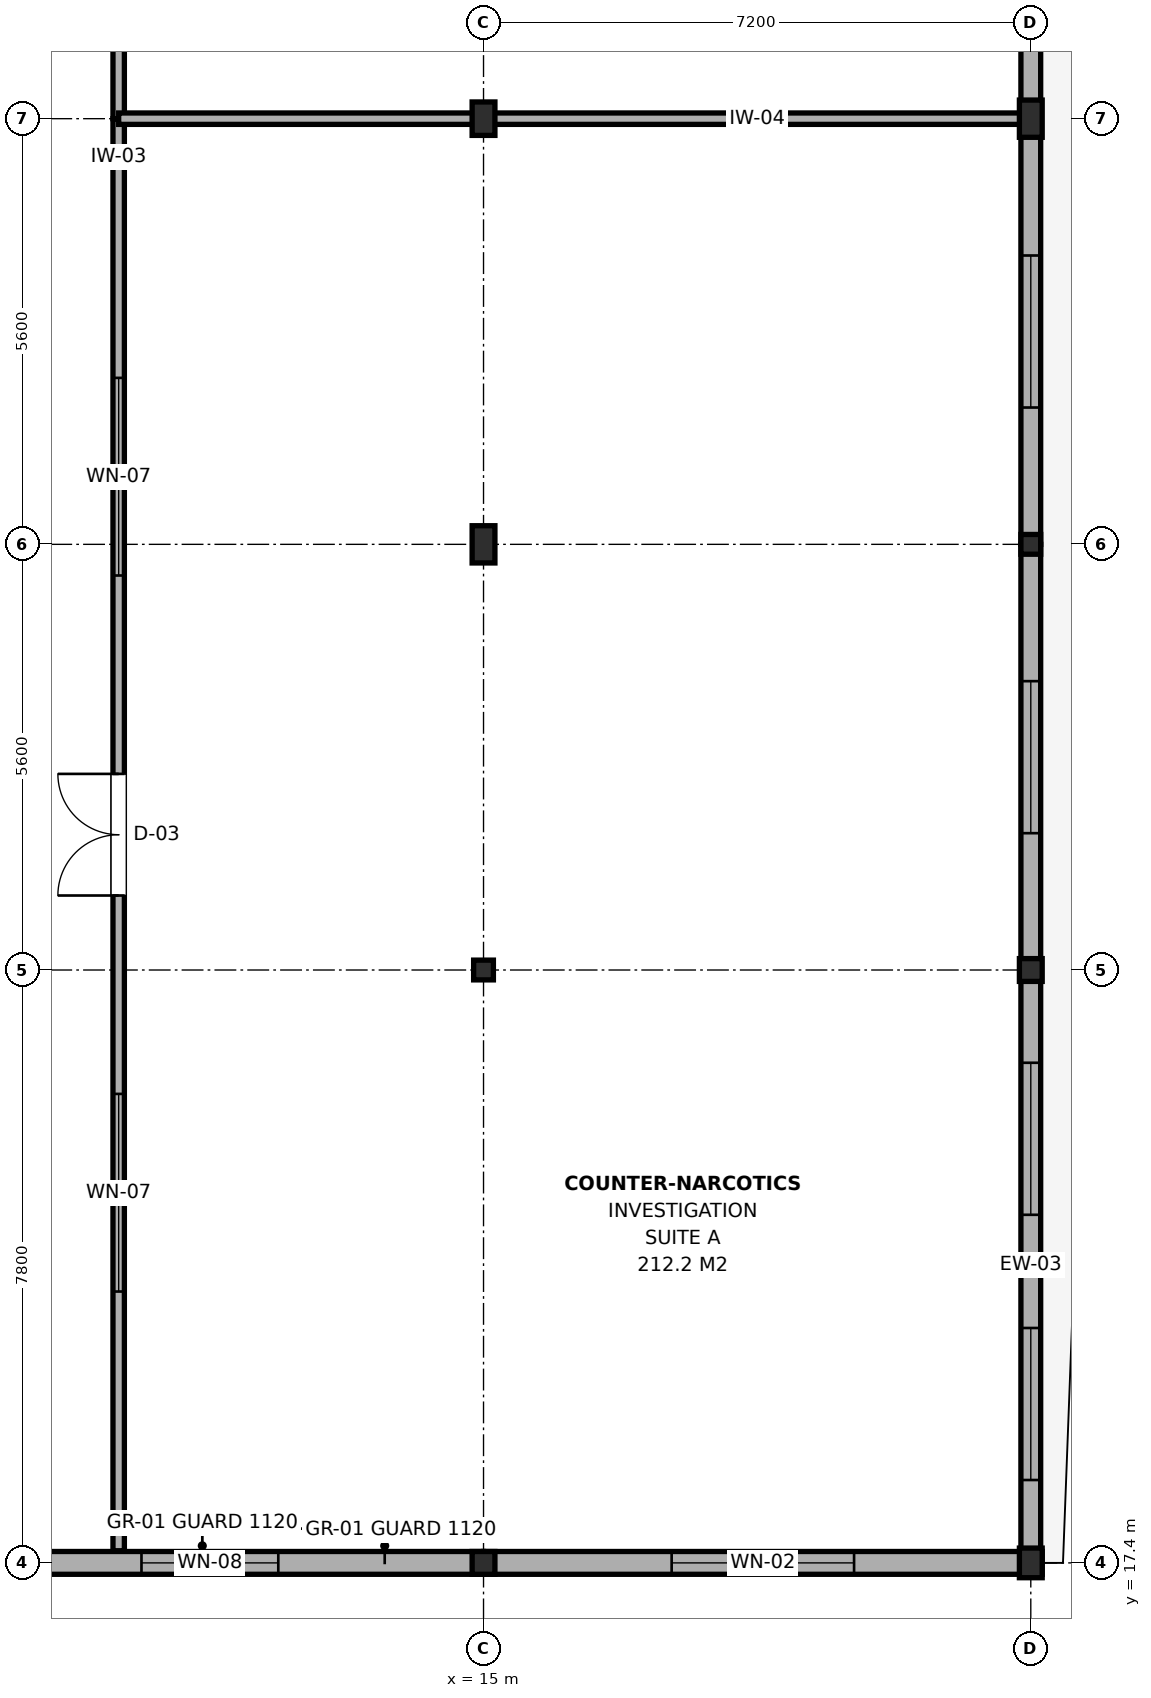
"""IFC4 building model, lengths in metres.
Left out: names, types, materials, properties, quantities, classifications, styles, units other than length and angle.
Written with IfcOpenShell. Run it as: python <this file> out.ifc"""

import sys

from ifc_helpers import new_model, si_unit, direction, frame, frame_2d, origin, origin_2d, place, context, subcontext, project, spatial, rectangle, i_section, extrude, element, fill, save


model = new_model("IFC4")
c1 = context("Model", 3, precision=1e-05, world=origin(), true_north=direction((0.0, 1.0)))
c2 = subcontext(c1, "Body", "Model", "MODEL_VIEW")
j1 = project(units=[si_unit("LENGTHUNIT", "METRE"), si_unit("PLANEANGLEUNIT", "RADIAN")], contexts=[c1])
p1 = place(None, origin())
s1 = spatial("IfcSite", under=j1, at=p1, CompositionType="ELEMENT")
p2 = place(p1, origin())
s2 = spatial("IfcBuilding", under=s1, at=p2, CompositionType="ELEMENT")
p3 = place(p2, frame((0.0, 0.0, 24.9)))
s3 = spatial("IfcBuildingStorey", under=s2, at=p3, CompositionType="ELEMENT", Elevation=24.9)
p4 = place(p3, frame((15.0, 17.4, 0.0), z_axis=(0.0, 0.0, 1.0), x_axis=(1.0, 0.0, 0.0)))
e1 = element("IfcColumn", 1, at=p4, inside=s3, PredefinedType="COLUMN", context=c2, shape_type="SweptSolid", body=[
    extrude(i_section(OverallWidth=0.3, OverallDepth=0.3, WebThickness=0.011, FlangeThickness=0.019, FilletRadius=0.027, at=origin_2d()), origin(), (0.0, 0.0, 1.0), 3.9),
])
p5 = place(p3, frame((15.0, 25.2, 0.0), z_axis=(0.0, 0.0, 1.0), x_axis=(1.0, 0.0, 0.0)))
e2 = element("IfcColumn", 2, at=p5, inside=s3, PredefinedType="COLUMN", context=c2, shape_type="SweptSolid", body=[
    extrude(i_section(OverallWidth=0.26, OverallDepth=0.26, WebThickness=0.01, FlangeThickness=0.018, FilletRadius=0.024, at=origin_2d()), origin(), (0.0, 0.0, 1.0), 3.9),
])
p6 = place(p3, frame((15.0, 30.8, 0.0), z_axis=(0.0, 0.0, 1.0), x_axis=(1.0, 0.0, 0.0)))
e3 = element("IfcColumn", 3, at=p6, inside=s3, PredefinedType="COLUMN", context=c2, shape_type="SweptSolid", body=[
    extrude(i_section(OverallWidth=0.3, OverallDepth=0.49, WebThickness=0.012, FlangeThickness=0.023, FilletRadius=0.027, at=origin_2d()), origin(), (0.0, 0.0, 1.0), 3.9),
])
p7 = place(p3, frame((15.0, 36.4, 0.0), z_axis=(0.0, 0.0, 1.0), x_axis=(1.0, 0.0, 0.0)))
e4 = element("IfcColumn", 4, at=p7, inside=s3, PredefinedType="COLUMN", context=c2, shape_type="SweptSolid", body=[
    extrude(i_section(OverallWidth=0.3, OverallDepth=0.44, WebThickness=0.011, FlangeThickness=0.021, FilletRadius=0.027, at=origin_2d()), origin(), (0.0, 0.0, 1.0), 3.9),
])
p8 = place(p3, frame((22.2, 17.4, 0.0), z_axis=(0.0, 0.0, 1.0), x_axis=(1.0, 0.0, 0.0)))
e5 = element("IfcColumn", 5, at=p8, inside=s3, PredefinedType="COLUMN", context=c2, shape_type="SweptSolid", body=[
    extrude(i_section(OverallWidth=0.3, OverallDepth=0.39, WebThickness=0.011, FlangeThickness=0.019, FilletRadius=0.027, at=origin_2d()), origin(), (0.0, 0.0, 1.0), 3.9),
])
p9 = place(p3, frame((22.2, 25.2, 0.0), z_axis=(0.0, 0.0, 1.0), x_axis=(1.0, 0.0, 0.0)))
e6 = element("IfcColumn", 6, at=p9, inside=s3, PredefinedType="COLUMN", context=c2, shape_type="SweptSolid", body=[
    extrude(i_section(OverallWidth=0.3, OverallDepth=0.3, WebThickness=0.011, FlangeThickness=0.019, FilletRadius=0.027, at=origin_2d()), origin(), (0.0, 0.0, 1.0), 3.9),
])
p10 = place(p3, frame((22.2, 30.8, 0.0), z_axis=(0.0, 0.0, 1.0), x_axis=(1.0, 0.0, 0.0)))
e7 = element("IfcColumn", 7, at=p10, inside=s3, PredefinedType="COLUMN", context=c2, shape_type="SweptSolid", body=[
    extrude(i_section(OverallWidth=0.26, OverallDepth=0.26, WebThickness=0.01, FlangeThickness=0.018, FilletRadius=0.024, at=origin_2d()), origin(), (0.0, 0.0, 1.0), 3.9),
])
p11 = place(p3, frame((22.2, 36.4, 0.0), z_axis=(0.0, 0.0, 1.0), x_axis=(1.0, 0.0, 0.0)))
e8 = element("IfcColumn", 8, at=p11, inside=s3, PredefinedType="COLUMN", context=c2, shape_type="SweptSolid", body=[
    extrude(i_section(OverallWidth=0.3, OverallDepth=0.49, WebThickness=0.012, FlangeThickness=0.023, FilletRadius=0.027, at=origin_2d()), origin(), (0.0, 0.0, 1.0), 3.9),
])
p12 = place(p3, frame((22.2, 17.27, 0.0), z_axis=(0.0, 0.0, 1.0), x_axis=(0.0, 1.0, 0.0)))
e9 = element("IfcWall", 9, at=p12, inside=s3, PredefinedType="SOLIDWALL", context=c2, shape_type="SweptSolid", body=[
    extrude(rectangle(XDim=7.93, YDim=0.26, at=frame_2d((3.965, 0.0))), origin(), (0.0, 0.0, 1.0), 3.265),
])
p13 = place(p12, frame((1.22, 0.0, 0.9)))
e10 = element("IfcOpeningElement", 10, at=p13, cuts=e9, PredefinedType="OPENING", context=c2, shape_type="SweptSolid", body=[
    extrude(rectangle(XDim=2.0, YDim=1.8, at=frame_2d((1.0, 0.9))), frame((0.0, 0.145, 0.0), z_axis=(0.0, -1.0, 0.0), x_axis=(1.0, 0.0, 0.0)), (0.0, 0.0, 1.0), 0.29),
])
p14 = place(p12, frame((4.71, 0.0, 0.9)))
e11 = element("IfcOpeningElement", 11, at=p14, cuts=e9, PredefinedType="OPENING", context=c2, shape_type="SweptSolid", body=[
    extrude(rectangle(XDim=2.0, YDim=1.8, at=frame_2d((1.0, 0.9))), frame((0.0, 0.145, 0.0), z_axis=(0.0, -1.0, 0.0), x_axis=(1.0, 0.0, 0.0)), (0.0, 0.0, 1.0), 0.29),
])
p15 = place(p3, frame((22.2, 25.2, 0.0), z_axis=(0.0, 0.0, 1.0), x_axis=(0.0, 1.0, 0.0)))
e12 = element("IfcWall", 12, at=p15, inside=s3, PredefinedType="SOLIDWALL", context=c2, shape_type="SweptSolid", body=[
    extrude(rectangle(XDim=5.6, YDim=0.26, at=frame_2d((2.8, 0.0))), origin(), (0.0, 0.0, 1.0), 3.265),
])
p16 = place(p15, frame((1.8, 0.0, 0.9)))
e13 = element("IfcOpeningElement", 13, at=p16, cuts=e12, PredefinedType="OPENING", context=c2, shape_type="SweptSolid", body=[
    extrude(rectangle(XDim=2.0, YDim=1.8, at=frame_2d((1.0, 0.9))), frame((0.0, 0.145, 0.0), z_axis=(0.0, -1.0, 0.0), x_axis=(1.0, 0.0, 0.0)), (0.0, 0.0, 1.0), 0.29),
])
p17 = place(p3, frame((22.2, 30.8, 0.0), z_axis=(0.0, 0.0, 1.0), x_axis=(0.0, 1.0, 0.0)))
e14 = element("IfcWall", 14, at=p17, inside=s3, PredefinedType="SOLIDWALL", context=c2, shape_type="SweptSolid", body=[
    extrude(rectangle(XDim=5.6, YDim=0.26, at=frame_2d((2.8, 0.0))), origin(), (0.0, 0.0, 1.0), 3.115),
])
p18 = place(p17, frame((1.8, 0.0, 0.9)))
e15 = element("IfcOpeningElement", 15, at=p18, cuts=e14, PredefinedType="OPENING", context=c2, shape_type="SweptSolid", body=[
    extrude(rectangle(XDim=2.0, YDim=1.8, at=frame_2d((1.0, 0.9))), frame((0.0, 0.145, 0.0), z_axis=(0.0, -1.0, 0.0), x_axis=(1.0, 0.0, 0.0)), (0.0, 0.0, 1.0), 0.29),
])
p19 = place(p3, frame((22.2, 36.4, 0.0), z_axis=(0.0, 0.0, 1.0), x_axis=(0.0, 1.0, 0.0)))
e16 = element("IfcWall", 16, at=p19, inside=s3, PredefinedType="SOLIDWALL", context=c2, shape_type="SweptSolid", body=[
    extrude(rectangle(XDim=5.6, YDim=0.26, at=frame_2d((2.8, 0.0))), origin(), (0.0, 0.0, 1.0), 3.115),
])
p20 = place(p19, frame((1.8, 0.0, 0.9)))
e17 = element("IfcOpeningElement", 17, at=p20, cuts=e16, PredefinedType="OPENING", context=c2, shape_type="SweptSolid", body=[
    extrude(rectangle(XDim=2.0, YDim=1.8, at=frame_2d((1.0, 0.9))), frame((0.0, 0.145, 0.0), z_axis=(0.0, -1.0, 0.0), x_axis=(1.0, 0.0, 0.0)), (0.0, 0.0, 1.0), 0.29),
])
p21 = place(p3, frame((7.8, 17.4, 0.0), z_axis=(0.0, 0.0, 1.0), x_axis=(1.0, 0.0, 0.0)))
e18 = element("IfcWall", 18, at=p21, inside=s3, PredefinedType="SOLIDWALL", context=c2, shape_type="SweptSolid", body=[
    extrude(rectangle(XDim=7.2, YDim=0.3, at=frame_2d((3.6, 0.0))), origin(), (0.0, 0.0, 1.0), 3.165),
])
p22 = place(p21, frame((2.7, 0.0, 0.65)))
e19 = element("IfcOpeningElement", 19, at=p22, cuts=e18, PredefinedType="OPENING", context=c2, shape_type="SweptSolid", body=[
    extrude(rectangle(XDim=1.8, YDim=1.2, at=frame_2d((0.9, 0.6))), frame((0.0, 0.165, 0.0), z_axis=(0.0, -1.0, 0.0), x_axis=(1.0, 0.0, 0.0)), (0.0, 0.0, 1.0), 0.33),
])
p23 = place(p3, frame((15.0, 17.4, 0.0), z_axis=(0.0, 0.0, 1.0), x_axis=(1.0, 0.0, 0.0)))
e20 = element("IfcWall", 20, at=p23, inside=s3, PredefinedType="SOLIDWALL", context=c2, shape_type="SweptSolid", body=[
    extrude(rectangle(XDim=7.35, YDim=0.3, at=frame_2d((3.675, 0.0))), origin(), (0.0, 0.0, 1.0), 3.215),
])
p24 = place(p23, frame((2.475, 0.0, 0.9)))
e21 = element("IfcOpeningElement", 21, at=p24, cuts=e20, PredefinedType="OPENING", context=c2, shape_type="SweptSolid", body=[
    extrude(rectangle(XDim=2.4, YDim=2.1, at=frame_2d((1.2, 1.05))), frame((0.0, 0.165, 0.0), z_axis=(0.0, -1.0, 0.0), x_axis=(1.0, 0.0, 0.0)), (0.0, 0.0, 1.0), 0.33),
])
p25 = place(p3, frame((10.2, 17.56, 0.0), z_axis=(0.0, 0.0, 1.0), x_axis=(0.0, 1.0, 0.0)))
e22 = element("IfcWall", 22, at=p25, inside=s3, PredefinedType="PARTITIONING", context=c2, shape_type="SweptSolid", body=[
    extrude(rectangle(XDim=18.84, YDim=0.15, at=frame_2d((9.42, 0.0))), origin(), (0.0, 0.0, 1.0), 3.165),
])
p26 = place(p25, frame((8.62, 0.0, 0.0)))
e23 = element("IfcOpeningElement", 23, at=p26, cuts=e22, PredefinedType="OPENING", context=c2, shape_type="SweptSolid", body=[
    extrude(rectangle(XDim=1.6, YDim=2.15, at=frame_2d((0.8, 1.075))), frame((0.0, 0.09, 0.0), z_axis=(0.0, -1.0, 0.0), x_axis=(1.0, 0.0, 0.0)), (0.0, 0.0, 1.0), 0.18),
])
p27 = place(p25, frame((3.41, 0.0, 0.95)))
e24 = element("IfcOpeningElement", 24, at=p27, cuts=e22, PredefinedType="OPENING", context=c2, shape_type="SweptSolid", body=[
    extrude(rectangle(XDim=2.6, YDim=1.5, at=frame_2d((1.3, 0.75))), frame((0.0, 0.09, 0.0), z_axis=(0.0, -1.0, 0.0), x_axis=(1.0, 0.0, 0.0)), (0.0, 0.0, 1.0), 0.18),
])
p28 = place(p25, frame((12.83, 0.0, 0.95)))
e25 = element("IfcOpeningElement", 25, at=p28, cuts=e22, PredefinedType="OPENING", context=c2, shape_type="SweptSolid", body=[
    extrude(rectangle(XDim=2.6, YDim=1.5, at=frame_2d((1.3, 0.75))), frame((0.0, 0.09, 0.0), z_axis=(0.0, -1.0, 0.0), x_axis=(1.0, 0.0, 0.0)), (0.0, 0.0, 1.0), 0.18),
])
p29 = place(p3, frame((10.2, 36.4, 0.0), z_axis=(0.0, 0.0, 1.0), x_axis=(0.0, 1.0, 0.0)))
e26 = element("IfcWall", 26, at=p29, inside=s3, PredefinedType="PARTITIONING", context=c2, shape_type="SweptSolid", body=[
    extrude(rectangle(XDim=16.8, YDim=0.15, at=frame_2d((8.4, 0.0))), origin(), (0.0, 0.0, 1.0), 3.165),
])
p30 = place(p29, frame((7.6, 0.0, 0.0)))
e27 = element("IfcOpeningElement", 27, at=p30, cuts=e26, PredefinedType="OPENING", context=c2, shape_type="SweptSolid", body=[
    extrude(rectangle(XDim=1.6, YDim=2.15, at=frame_2d((0.8, 1.075))), frame((0.0, 0.09, 0.0), z_axis=(0.0, -1.0, 0.0), x_axis=(1.0, 0.0, 0.0)), (0.0, 0.0, 1.0), 0.18),
])
p31 = place(p29, frame((2.9, 0.0, 0.95)))
e28 = element("IfcOpeningElement", 28, at=p31, cuts=e26, PredefinedType="OPENING", context=c2, shape_type="SweptSolid", body=[
    extrude(rectangle(XDim=2.6, YDim=1.5, at=frame_2d((1.3, 0.75))), frame((0.0, 0.09, 0.0), z_axis=(0.0, -1.0, 0.0), x_axis=(1.0, 0.0, 0.0)), (0.0, 0.0, 1.0), 0.18),
])
p32 = place(p29, frame((11.3, 0.0, 0.95)))
e29 = element("IfcOpeningElement", 29, at=p32, cuts=e26, PredefinedType="OPENING", context=c2, shape_type="SweptSolid", body=[
    extrude(rectangle(XDim=2.6, YDim=1.5, at=frame_2d((1.3, 0.75))), frame((0.0, 0.09, 0.0), z_axis=(0.0, -1.0, 0.0), x_axis=(1.0, 0.0, 0.0)), (0.0, 0.0, 1.0), 0.18),
])
p33 = place(p3, frame((10.2, 36.4, 0.0), z_axis=(0.0, 0.0, 1.0), x_axis=(1.0, 0.0, 0.0)))
e30 = element("IfcWall", 30, at=p33, inside=s3, PredefinedType="PARTITIONING", context=c2, shape_type="SweptSolid", body=[
    extrude(rectangle(XDim=11.86, YDim=0.15, at=frame_2d((5.93, 0.0))), origin(), (0.0, 0.0, 1.0), 3.365),
])
p34 = place(p13, origin())
e31 = element("IfcWindow", 31, at=p34, inside=s3, PartitioningType="SINGLE_PANEL", PredefinedType="WINDOW", context=c2, shape_type="SweptSolid", body=[
    extrude(rectangle(XDim=2.0, YDim=1.8, at=frame_2d((1.0, 0.9))), frame((0.0, 0.03, 0.0), z_axis=(0.0, -1.0, 0.0), x_axis=(1.0, 0.0, 0.0)), (0.0, 0.0, 1.0), 0.06),
])
fill(e10, e31)
p35 = place(p14, origin())
e32 = element("IfcWindow", 32, at=p35, inside=s3, PartitioningType="SINGLE_PANEL", PredefinedType="WINDOW", context=c2, shape_type="SweptSolid", body=[
    extrude(rectangle(XDim=2.0, YDim=1.8, at=frame_2d((1.0, 0.9))), frame((0.0, 0.03, 0.0), z_axis=(0.0, -1.0, 0.0), x_axis=(1.0, 0.0, 0.0)), (0.0, 0.0, 1.0), 0.06),
])
fill(e11, e32)
p36 = place(p16, origin())
e33 = element("IfcWindow", 33, at=p36, inside=s3, PartitioningType="SINGLE_PANEL", PredefinedType="WINDOW", context=c2, shape_type="SweptSolid", body=[
    extrude(rectangle(XDim=2.0, YDim=1.8, at=frame_2d((1.0, 0.9))), frame((0.0, 0.03, 0.0), z_axis=(0.0, -1.0, 0.0), x_axis=(1.0, 0.0, 0.0)), (0.0, 0.0, 1.0), 0.06),
])
fill(e13, e33)
p37 = place(p18, origin())
e34 = element("IfcWindow", 34, at=p37, inside=s3, PartitioningType="SINGLE_PANEL", PredefinedType="WINDOW", context=c2, shape_type="SweptSolid", body=[
    extrude(rectangle(XDim=2.0, YDim=1.8, at=frame_2d((1.0, 0.9))), frame((0.0, 0.03, 0.0), z_axis=(0.0, -1.0, 0.0), x_axis=(1.0, 0.0, 0.0)), (0.0, 0.0, 1.0), 0.06),
])
fill(e15, e34)
p38 = place(p22, origin())
e35 = element("IfcWindow", 35, at=p38, inside=s3, PartitioningType="SINGLE_PANEL", PredefinedType="WINDOW", context=c2, shape_type="SweptSolid", body=[
    extrude(rectangle(XDim=1.8, YDim=1.2, at=frame_2d((0.9, 0.6))), frame((0.0, 0.03, 0.0), z_axis=(0.0, -1.0, 0.0), x_axis=(1.0, 0.0, 0.0)), (0.0, 0.0, 1.0), 0.06),
])
fill(e19, e35)
p39 = place(p24, origin())
e36 = element("IfcWindow", 36, at=p39, inside=s3, PartitioningType="SINGLE_PANEL", PredefinedType="WINDOW", context=c2, shape_type="SweptSolid", body=[
    extrude(rectangle(XDim=2.4, YDim=2.1, at=frame_2d((1.2, 1.05))), frame((0.0, 0.03, 0.0), z_axis=(0.0, -1.0, 0.0), x_axis=(1.0, 0.0, 0.0)), (0.0, 0.0, 1.0), 0.06),
])
fill(e21, e36)
p40 = place(p26, origin())
e37 = element("IfcDoor", 37, at=p40, inside=s3, OperationType="DOUBLE_DOOR_SINGLE_SWING", PredefinedType="DOOR", context=c2, shape_type="SweptSolid", body=[
    extrude(rectangle(XDim=1.6, YDim=2.15, at=frame_2d((0.8, 1.075))), frame((0.0, 0.025, 0.0), z_axis=(0.0, -1.0, 0.0), x_axis=(1.0, 0.0, 0.0)), (0.0, 0.0, 1.0), 0.05),
])
fill(e23, e37)
p41 = place(p27, origin())
e38 = element("IfcWindow", 38, at=p41, inside=s3, PartitioningType="SINGLE_PANEL", PredefinedType="WINDOW", context=c2, shape_type="SweptSolid", body=[
    extrude(rectangle(XDim=2.6, YDim=1.5, at=frame_2d((1.3, 0.75))), frame((0.0, 0.03, 0.0), z_axis=(0.0, -1.0, 0.0), x_axis=(1.0, 0.0, 0.0)), (0.0, 0.0, 1.0), 0.06),
])
fill(e24, e38)
p42 = place(p28, origin())
e39 = element("IfcWindow", 39, at=p42, inside=s3, PartitioningType="SINGLE_PANEL", PredefinedType="WINDOW", context=c2, shape_type="SweptSolid", body=[
    extrude(rectangle(XDim=2.6, YDim=1.5, at=frame_2d((1.3, 0.75))), frame((0.0, 0.03, 0.0), z_axis=(0.0, -1.0, 0.0), x_axis=(1.0, 0.0, 0.0)), (0.0, 0.0, 1.0), 0.06),
])
fill(e25, e39)
save(model, sys.argv[1])
